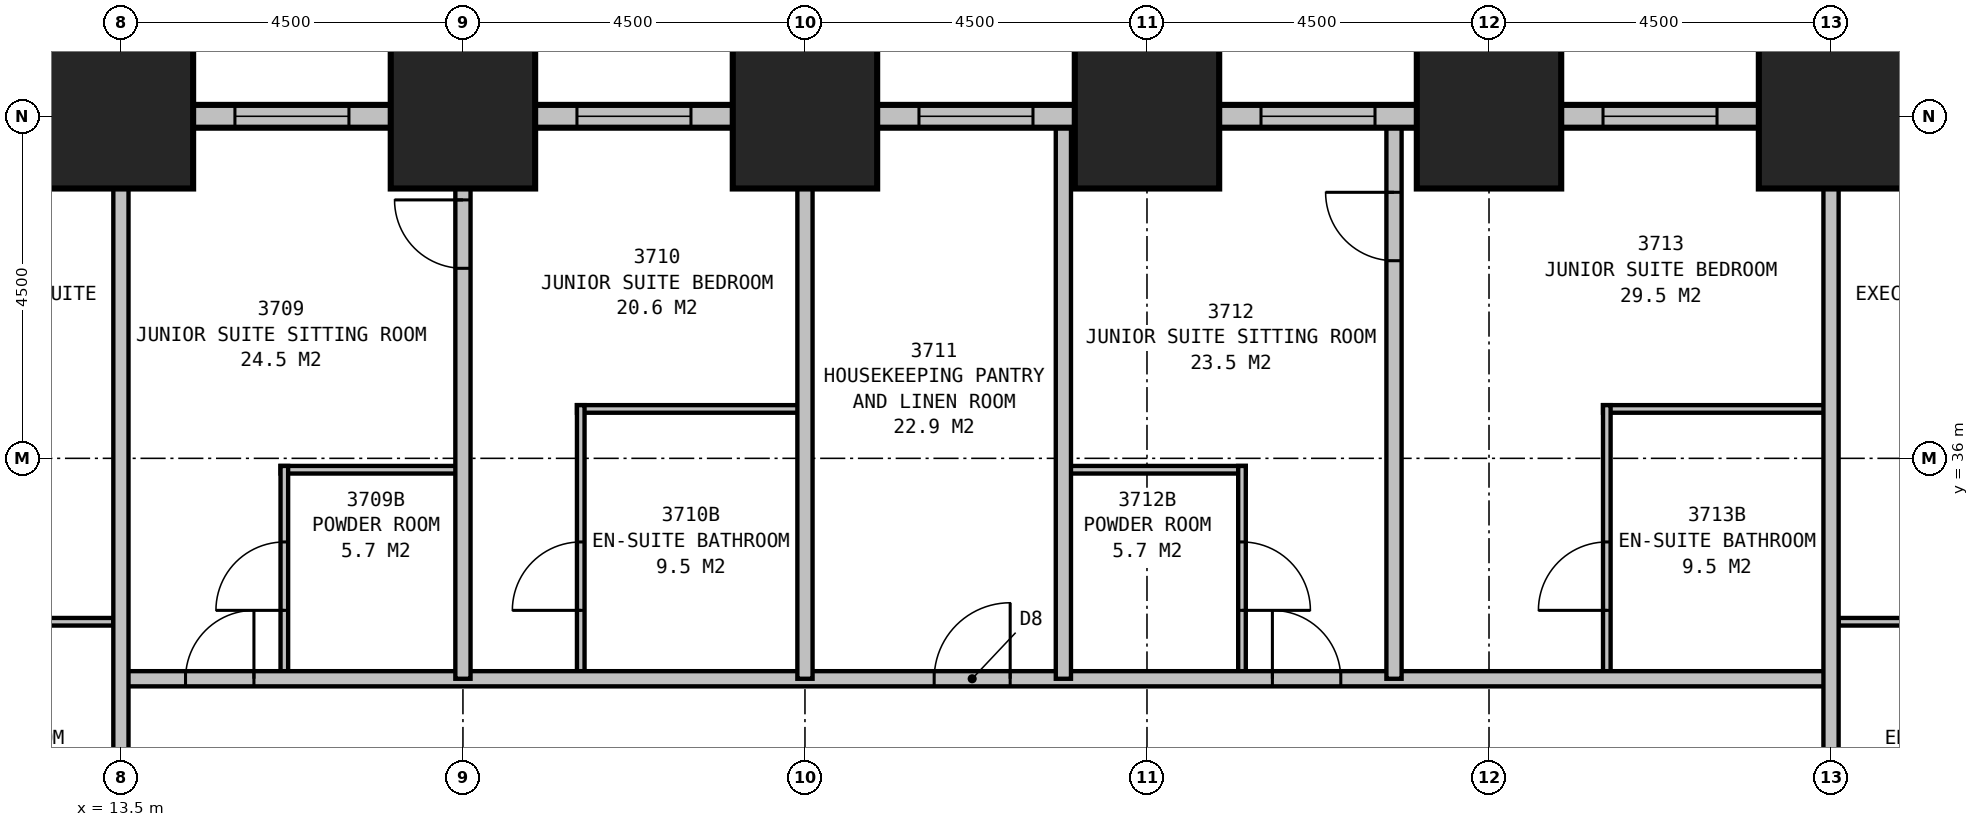
"""IFC4 building model, lengths in metres.
Left out: names, types, materials, properties, quantities, classifications, styles, units other than length and angle.
Written with IfcOpenShell. Run it as: python <this file> out.ifc"""

import sys

from ifc_helpers import new_model, si_unit, direction, frame, frame_2d, origin, origin_2d, place, context, subcontext, project, spatial, rectangle, extrude, element, fill, save


model = new_model("IFC4")
c1 = context("Model", 3, precision=1e-05, world=origin(), true_north=direction((0.0, 1.0)))
c2 = subcontext(c1, "Body", "Model", "MODEL_VIEW")
j1 = project(units=[si_unit("LENGTHUNIT", "METRE"), si_unit("PLANEANGLEUNIT", "RADIAN")], contexts=[c1])
p1 = place(None, origin())
s1 = spatial("IfcSite", under=j1, at=p1, CompositionType="ELEMENT")
p2 = place(p1, origin())
s2 = spatial("IfcBuilding", under=s1, at=p2, CompositionType="ELEMENT")
p3 = place(p2, frame((0.0, 0.0, 142.4)))
s3 = spatial("IfcBuildingStorey", under=s2, at=p3, CompositionType="ELEMENT", Elevation=142.4)
for number, where, z_axis, x_axis in (
    (1, (36.0, 40.5, 0.0), (0.0, 0.0, 1.0), (1.0, 0.0, 0.0)),
    (2, (31.5, 40.5, 0.0), (0.0, 0.0, 1.0), (1.0, 0.0, 0.0)),
    (3, (27.0, 40.5, 0.0), (0.0, 0.0, 1.0), (1.0, 0.0, 0.0)),
    (4, (22.5, 40.5, 0.0), (0.0, 0.0, 1.0), (1.0, 0.0, 0.0)),
    (5, (18.0, 40.5, 0.0), (0.0, 0.0, 1.0), (1.0, 0.0, 0.0)),
    (6, (13.5, 40.5, 0.0), (0.0, 0.0, 1.0), (1.0, 0.0, 0.0)),
):
    element("IfcColumn", number, at=place(p3, frame(where, z_axis=z_axis, x_axis=x_axis)), inside=s3, PredefinedType="COLUMN", context=c2, shape_type="SweptSolid", body=[
        extrude(rectangle(XDim=1.9, YDim=1.9, at=origin_2d()), origin(), (0.0, 0.0, 1.0), 3.5),
    ])
p4 = place(p3, frame((40.65, 40.5, 0.0), z_axis=(0.0, 0.0, 1.0), x_axis=(-1.0, 0.0, 0.0)))
e7 = element("IfcWall", 7, at=p4, inside=s3, PredefinedType="STANDARD", context=c2, shape_type="SweptSolid", body=[
    extrude(rectangle(XDim=31.8, YDim=0.3, at=frame_2d((15.9, 0.0))), origin(), (0.0, 0.0, 1.0), 2.1),
])
p5 = place(p4, frame((1.65, 0.0, 0.5)))
e8 = element("IfcOpeningElement", 8, at=p5, cuts=e7, PredefinedType="OPENING", context=c2, shape_type="SweptSolid", body=[
    extrude(rectangle(XDim=1.5, YDim=1.4, at=frame_2d((0.75, 0.7))), frame((0.0, 0.16, 0.0), z_axis=(0.0, -1.0, 0.0), x_axis=(1.0, 0.0, 0.0)), (0.0, 0.0, 1.0), 0.32),
])
p6 = place(p4, frame((6.15, 0.0, 0.5)))
e9 = element("IfcOpeningElement", 9, at=p6, cuts=e7, PredefinedType="OPENING", context=c2, shape_type="SweptSolid", body=[
    extrude(rectangle(XDim=1.5, YDim=1.4, at=frame_2d((0.75, 0.7))), frame((0.0, 0.16, 0.0), z_axis=(0.0, -1.0, 0.0), x_axis=(1.0, 0.0, 0.0)), (0.0, 0.0, 1.0), 0.32),
])
p7 = place(p4, frame((10.65, 0.0, 0.5)))
e10 = element("IfcOpeningElement", 10, at=p7, cuts=e7, PredefinedType="OPENING", context=c2, shape_type="SweptSolid", body=[
    extrude(rectangle(XDim=1.5, YDim=1.4, at=frame_2d((0.75, 0.7))), frame((0.0, 0.16, 0.0), z_axis=(0.0, -1.0, 0.0), x_axis=(1.0, 0.0, 0.0)), (0.0, 0.0, 1.0), 0.32),
])
p8 = place(p4, frame((15.15, 0.0, 0.5)))
e11 = element("IfcOpeningElement", 11, at=p8, cuts=e7, PredefinedType="OPENING", context=c2, shape_type="SweptSolid", body=[
    extrude(rectangle(XDim=1.5, YDim=1.4, at=frame_2d((0.75, 0.7))), frame((0.0, 0.16, 0.0), z_axis=(0.0, -1.0, 0.0), x_axis=(1.0, 0.0, 0.0)), (0.0, 0.0, 1.0), 0.32),
])
p9 = place(p4, frame((19.65, 0.0, 0.5)))
e12 = element("IfcOpeningElement", 12, at=p9, cuts=e7, PredefinedType="OPENING", context=c2, shape_type="SweptSolid", body=[
    extrude(rectangle(XDim=1.5, YDim=1.4, at=frame_2d((0.75, 0.7))), frame((0.0, 0.16, 0.0), z_axis=(0.0, -1.0, 0.0), x_axis=(1.0, 0.0, 0.0)), (0.0, 0.0, 1.0), 0.32),
])
p10 = place(p4, frame((24.15, 0.0, 0.5)))
e13 = element("IfcOpeningElement", 13, at=p10, cuts=e7, PredefinedType="OPENING", context=c2, shape_type="SweptSolid", body=[
    extrude(rectangle(XDim=1.5, YDim=1.4, at=frame_2d((0.75, 0.7))), frame((0.0, 0.16, 0.0), z_axis=(0.0, -1.0, 0.0), x_axis=(1.0, 0.0, 0.0)), (0.0, 0.0, 1.0), 0.32),
])
p11 = place(p4, frame((28.65, 0.0, 0.5)))
e14 = element("IfcOpeningElement", 14, at=p11, cuts=e7, PredefinedType="OPENING", context=c2, shape_type="SweptSolid", body=[
    extrude(rectangle(XDim=1.5, YDim=1.4, at=frame_2d((0.75, 0.7))), frame((0.0, 0.16, 0.0), z_axis=(0.0, -1.0, 0.0), x_axis=(1.0, 0.0, 0.0)), (0.0, 0.0, 1.0), 0.32),
])
p12 = place(p3, frame((13.5, 33.1, 0.0), z_axis=(0.0, 0.0, 1.0), x_axis=(1.0, 0.0, 0.0)))
e15 = element("IfcWall", 15, at=p12, inside=s3, PredefinedType="PARTITIONING", context=c2, shape_type="SweptSolid", body=[
    extrude(rectangle(XDim=22.5, YDim=0.2, at=frame_2d((11.25, 0.0))), origin(), (0.0, 0.0, 1.0), 3.25),
])
p13 = place(p12, frame((0.85, 0.0, 0.0)))
e16 = element("IfcOpeningElement", 16, at=p13, cuts=e15, PredefinedType="OPENING", context=c2, shape_type="SweptSolid", body=[
    extrude(rectangle(XDim=0.9, YDim=2.1, at=frame_2d((0.45, 1.05))), frame((0.0, 0.11, 0.0), z_axis=(0.0, -1.0, 0.0), x_axis=(1.0, 0.0, 0.0)), (0.0, 0.0, 1.0), 0.22),
])
p14 = place(p12, frame((10.7, 0.0, 0.0)))
e17 = element("IfcOpeningElement", 17, at=p14, cuts=e15, PredefinedType="OPENING", context=c2, shape_type="SweptSolid", body=[
    extrude(rectangle(XDim=1.0, YDim=2.1, at=frame_2d((0.5, 1.05))), frame((0.0, 0.11, 0.0), z_axis=(0.0, -1.0, 0.0), x_axis=(1.0, 0.0, 0.0)), (0.0, 0.0, 1.0), 0.22),
])
p15 = place(p12, frame((15.15, 0.0, 0.0)))
e18 = element("IfcOpeningElement", 18, at=p15, cuts=e15, PredefinedType="OPENING", context=c2, shape_type="SweptSolid", body=[
    extrude(rectangle(XDim=0.9, YDim=2.1, at=frame_2d((0.45, 1.05))), frame((0.0, 0.11, 0.0), z_axis=(0.0, -1.0, 0.0), x_axis=(1.0, 0.0, 0.0)), (0.0, 0.0, 1.0), 0.22),
])
p16 = place(p3, frame((18.0, 33.1, 0.0), z_axis=(0.0, 0.0, 1.0), x_axis=(0.0, 1.0, 0.0)))
e19 = element("IfcWall", 19, at=p16, inside=s3, PredefinedType="PARTITIONING", context=c2, shape_type="SweptSolid", body=[
    extrude(rectangle(XDim=7.4, YDim=0.2, at=frame_2d((3.7, 0.0))), origin(), (0.0, 0.0, 1.0), 2.2),
])
p17 = place(p16, frame((5.4, 0.0, 0.0)))
e20 = element("IfcOpeningElement", 20, at=p17, cuts=e19, PredefinedType="OPENING", context=c2, shape_type="SweptSolid", body=[
    extrude(rectangle(XDim=0.9, YDim=2.1, at=frame_2d((0.45, 1.05))), frame((0.0, 0.11, 0.0), z_axis=(0.0, -1.0, 0.0), x_axis=(1.0, 0.0, 0.0)), (0.0, 0.0, 1.0), 0.22),
])
p18 = place(p3, frame((22.5, 33.1, 0.0), z_axis=(0.0, 0.0, 1.0), x_axis=(0.0, 1.0, 0.0)))
e21 = element("IfcWall", 21, at=p18, inside=s3, PredefinedType="PARTITIONING", context=c2, shape_type="SweptSolid", body=[
    extrude(rectangle(XDim=7.4, YDim=0.2, at=frame_2d((3.7, 0.0))), origin(), (0.0, 0.0, 1.0), 2.2),
])
p19 = place(p3, frame((25.9, 33.1, 0.0), z_axis=(0.0, 0.0, 1.0), x_axis=(0.0, 1.0, 0.0)))
e22 = element("IfcWall", 22, at=p19, inside=s3, PredefinedType="PARTITIONING", context=c2, shape_type="SweptSolid", body=[
    extrude(rectangle(XDim=7.4, YDim=0.2, at=frame_2d((3.7, 0.0))), origin(), (0.0, 0.0, 1.0), 3.25),
])
p20 = place(p3, frame((30.25, 33.1, 0.0), z_axis=(0.0, 0.0, 1.0), x_axis=(0.0, 1.0, 0.0)))
e23 = element("IfcWall", 23, at=p20, inside=s3, PredefinedType="PARTITIONING", context=c2, shape_type="SweptSolid", body=[
    extrude(rectangle(XDim=7.4, YDim=0.2, at=frame_2d((3.7, 0.0))), origin(), (0.0, 0.0, 1.0), 3.25),
])
p21 = place(p20, frame((5.5, 0.0, 0.0)))
e24 = element("IfcOpeningElement", 24, at=p21, cuts=e23, PredefinedType="OPENING", context=c2, shape_type="SweptSolid", body=[
    extrude(rectangle(XDim=0.9, YDim=2.1, at=frame_2d((0.45, 1.05))), frame((0.0, 0.11, 0.0), z_axis=(0.0, -1.0, 0.0), x_axis=(1.0, 0.0, 0.0)), (0.0, 0.0, 1.0), 0.22),
])
p22 = place(p3, frame((15.6, 35.85, 0.0), z_axis=(0.0, 0.0, 1.0), x_axis=(1.0, 0.0, 0.0)))
e25 = element("IfcWall", 25, at=p22, inside=s3, PredefinedType="PLUMBINGWALL", context=c2, shape_type="SweptSolid", body=[
    extrude(rectangle(XDim=2.4, YDim=0.1, at=frame_2d((1.2, 0.0))), origin(), (0.0, 0.0, 1.0), 3.25),
])
p23 = place(p3, frame((15.65, 33.1, 0.0), z_axis=(0.0, 0.0, 1.0), x_axis=(0.0, 1.0, 0.0)))
e26 = element("IfcWall", 26, at=p23, inside=s3, PredefinedType="PLUMBINGWALL", context=c2, shape_type="SweptSolid", body=[
    extrude(rectangle(XDim=2.8, YDim=0.1, at=frame_2d((1.4, 0.0))), origin(), (0.0, 0.0, 1.0), 3.25),
])
p24 = place(p23, frame((0.9, 0.0, 0.0)))
e27 = element("IfcOpeningElement", 27, at=p24, cuts=e26, PredefinedType="OPENING", context=c2, shape_type="SweptSolid", body=[
    extrude(rectangle(XDim=0.9, YDim=2.1, at=frame_2d((0.45, 1.05))), frame((0.0, 0.06, 0.0), z_axis=(0.0, -1.0, 0.0), x_axis=(1.0, 0.0, 0.0)), (0.0, 0.0, 1.0), 0.12),
])
p25 = place(p3, frame((19.5, 36.65, 0.0), z_axis=(0.0, 0.0, 1.0), x_axis=(1.0, 0.0, 0.0)))
e28 = element("IfcWall", 28, at=p25, inside=s3, PredefinedType="PLUMBINGWALL", context=c2, shape_type="SweptSolid", body=[
    extrude(rectangle(XDim=3.0, YDim=0.1, at=frame_2d((1.5, 0.0))), origin(), (0.0, 0.0, 1.0), 3.25),
])
p26 = place(p3, frame((19.55, 33.1, 0.0), z_axis=(0.0, 0.0, 1.0), x_axis=(0.0, 1.0, 0.0)))
e29 = element("IfcWall", 29, at=p26, inside=s3, PredefinedType="PLUMBINGWALL", context=c2, shape_type="SweptSolid", body=[
    extrude(rectangle(XDim=3.6, YDim=0.1, at=frame_2d((1.8, 0.0))), origin(), (0.0, 0.0, 1.0), 3.25),
])
p27 = place(p26, frame((0.9, 0.0, 0.0)))
e30 = element("IfcOpeningElement", 30, at=p27, cuts=e29, PredefinedType="OPENING", context=c2, shape_type="SweptSolid", body=[
    extrude(rectangle(XDim=0.9, YDim=2.1, at=frame_2d((0.45, 1.05))), frame((0.0, 0.06, 0.0), z_axis=(0.0, -1.0, 0.0), x_axis=(1.0, 0.0, 0.0)), (0.0, 0.0, 1.0), 0.12),
])
p28 = place(p3, frame((25.9, 35.85, 0.0), z_axis=(0.0, 0.0, 1.0), x_axis=(1.0, 0.0, 0.0)))
e31 = element("IfcWall", 31, at=p28, inside=s3, PredefinedType="PLUMBINGWALL", context=c2, shape_type="SweptSolid", body=[
    extrude(rectangle(XDim=2.4, YDim=0.1, at=frame_2d((1.2, 0.0))), origin(), (0.0, 0.0, 1.0), 3.25),
])
p29 = place(p3, frame((28.25, 33.1, 0.0), z_axis=(0.0, 0.0, 1.0), x_axis=(0.0, 1.0, 0.0)))
e32 = element("IfcWall", 32, at=p29, inside=s3, PredefinedType="PLUMBINGWALL", context=c2, shape_type="SweptSolid", body=[
    extrude(rectangle(XDim=2.8, YDim=0.1, at=frame_2d((1.4, 0.0))), origin(), (0.0, 0.0, 1.0), 3.25),
])
p30 = place(p29, frame((1.8, 0.0, 0.0), z_axis=(0.0, 0.0, 1.0), x_axis=(-1.0, 0.0, 0.0)))
e33 = element("IfcOpeningElement", 33, at=p30, cuts=e32, PredefinedType="OPENING", context=c2, shape_type="SweptSolid", body=[
    extrude(rectangle(XDim=0.9, YDim=2.1, at=frame_2d((0.45, 1.05))), frame((0.0, 0.06, 0.0), z_axis=(0.0, -1.0, 0.0), x_axis=(1.0, 0.0, 0.0)), (0.0, 0.0, 1.0), 0.12),
])
p31 = place(p3, frame((33.0, 36.65, 0.0), z_axis=(0.0, 0.0, 1.0), x_axis=(1.0, 0.0, 0.0)))
e34 = element("IfcWall", 34, at=p31, inside=s3, PredefinedType="PLUMBINGWALL", context=c2, shape_type="SweptSolid", body=[
    extrude(rectangle(XDim=3.0, YDim=0.1, at=frame_2d((1.5, 0.0))), origin(), (0.0, 0.0, 1.0), 3.25),
])
p32 = place(p3, frame((33.05, 33.1, 0.0), z_axis=(0.0, 0.0, 1.0), x_axis=(0.0, 1.0, 0.0)))
e35 = element("IfcWall", 35, at=p32, inside=s3, PredefinedType="PLUMBINGWALL", context=c2, shape_type="SweptSolid", body=[
    extrude(rectangle(XDim=3.6, YDim=0.1, at=frame_2d((1.8, 0.0))), origin(), (0.0, 0.0, 1.0), 3.25),
])
p33 = place(p32, frame((0.9, 0.0, 0.0)))
e36 = element("IfcOpeningElement", 36, at=p33, cuts=e35, PredefinedType="OPENING", context=c2, shape_type="SweptSolid", body=[
    extrude(rectangle(XDim=0.9, YDim=2.1, at=frame_2d((0.45, 1.05))), frame((0.0, 0.06, 0.0), z_axis=(0.0, -1.0, 0.0), x_axis=(1.0, 0.0, 0.0)), (0.0, 0.0, 1.0), 0.12),
])
p34 = place(p3, frame((36.0, 29.3, 0.0), z_axis=(0.0, 0.0, 1.0), x_axis=(0.0, 1.0, 0.0)))
e37 = element("IfcWall", 37, at=p34, inside=s3, PredefinedType="PARTITIONING", context=c2, shape_type="SweptSolid", body=[
    extrude(rectangle(XDim=11.2, YDim=0.2, at=frame_2d((5.6, 0.0))), origin(), (0.0, 0.0, 1.0), 2.2),
])
p35 = place(p3, frame((36.1, 33.85, 0.0), z_axis=(0.0, 0.0, 1.0), x_axis=(1.0, 0.0, 0.0)))
e38 = element("IfcWall", 38, at=p35, inside=s3, PredefinedType="PLUMBINGWALL", context=c2, shape_type="SweptSolid", body=[
    extrude(rectangle(XDim=3.5, YDim=0.1, at=frame_2d((1.75, 0.0))), origin(), (0.0, 0.0, 1.0), 3.25),
])
p36 = place(p35, frame((0.9, 0.0, 0.0)))
e39 = element("IfcOpeningElement", 39, at=p36, cuts=e38, PredefinedType="OPENING", context=c2, shape_type="SweptSolid", body=[
    extrude(rectangle(XDim=0.9, YDim=2.1, at=frame_2d((0.45, 1.05))), frame((0.0, 0.06, 0.0), z_axis=(0.0, -1.0, 0.0), x_axis=(1.0, 0.0, 0.0)), (0.0, 0.0, 1.0), 0.12),
])
p37 = place(p3, frame((13.5, 29.3, 0.0), z_axis=(0.0, 0.0, 1.0), x_axis=(0.0, 1.0, 0.0)))
e40 = element("IfcWall", 40, at=p37, inside=s3, PredefinedType="PARTITIONING", context=c2, shape_type="SweptSolid", body=[
    extrude(rectangle(XDim=11.2, YDim=0.2, at=frame_2d((5.6, 0.0))), origin(), (0.0, 0.0, 1.0), 2.2),
])
p38 = place(p3, frame((13.4, 33.85, 0.0), z_axis=(0.0, 0.0, 1.0), x_axis=(-1.0, 0.0, 0.0)))
e41 = element("IfcWall", 41, at=p38, inside=s3, PredefinedType="PLUMBINGWALL", context=c2, shape_type="SweptSolid", body=[
    extrude(rectangle(XDim=3.5, YDim=0.1, at=frame_2d((1.75, 0.0))), origin(), (0.0, 0.0, 1.0), 3.25),
])
p39 = place(p38, frame((1.8, 0.0, 0.0), z_axis=(0.0, 0.0, 1.0), x_axis=(-1.0, 0.0, 0.0)))
e42 = element("IfcOpeningElement", 42, at=p39, cuts=e41, PredefinedType="OPENING", context=c2, shape_type="SweptSolid", body=[
    extrude(rectangle(XDim=0.9, YDim=2.1, at=frame_2d((0.45, 1.05))), frame((0.0, 0.06, 0.0), z_axis=(0.0, -1.0, 0.0), x_axis=(1.0, 0.0, 0.0)), (0.0, 0.0, 1.0), 0.12),
])
p40 = place(p6, origin())
e43 = element("IfcWindow", 43, at=p40, inside=s3, PartitioningType="SINGLE_PANEL", PredefinedType="WINDOW", context=c2, shape_type="SweptSolid", body=[
    extrude(rectangle(XDim=1.5, YDim=1.4, at=frame_2d((0.75, 0.7))), frame((0.0, 0.03, 0.0), z_axis=(0.0, -1.0, 0.0), x_axis=(1.0, 0.0, 0.0)), (0.0, 0.0, 1.0), 0.06),
])
fill(e9, e43)
p41 = place(p7, origin())
e44 = element("IfcWindow", 44, at=p41, inside=s3, PartitioningType="SINGLE_PANEL", PredefinedType="WINDOW", context=c2, shape_type="SweptSolid", body=[
    extrude(rectangle(XDim=1.5, YDim=1.4, at=frame_2d((0.75, 0.7))), frame((0.0, 0.03, 0.0), z_axis=(0.0, -1.0, 0.0), x_axis=(1.0, 0.0, 0.0)), (0.0, 0.0, 1.0), 0.06),
])
fill(e10, e44)
p42 = place(p8, origin())
e45 = element("IfcWindow", 45, at=p42, inside=s3, PartitioningType="SINGLE_PANEL", PredefinedType="WINDOW", context=c2, shape_type="SweptSolid", body=[
    extrude(rectangle(XDim=1.5, YDim=1.4, at=frame_2d((0.75, 0.7))), frame((0.0, 0.03, 0.0), z_axis=(0.0, -1.0, 0.0), x_axis=(1.0, 0.0, 0.0)), (0.0, 0.0, 1.0), 0.06),
])
fill(e11, e45)
p43 = place(p9, origin())
e46 = element("IfcWindow", 46, at=p43, inside=s3, PartitioningType="SINGLE_PANEL", PredefinedType="WINDOW", context=c2, shape_type="SweptSolid", body=[
    extrude(rectangle(XDim=1.5, YDim=1.4, at=frame_2d((0.75, 0.7))), frame((0.0, 0.03, 0.0), z_axis=(0.0, -1.0, 0.0), x_axis=(1.0, 0.0, 0.0)), (0.0, 0.0, 1.0), 0.06),
])
fill(e12, e46)
p44 = place(p10, origin())
e47 = element("IfcWindow", 47, at=p44, inside=s3, PartitioningType="SINGLE_PANEL", PredefinedType="WINDOW", context=c2, shape_type="SweptSolid", body=[
    extrude(rectangle(XDim=1.5, YDim=1.4, at=frame_2d((0.75, 0.7))), frame((0.0, 0.03, 0.0), z_axis=(0.0, -1.0, 0.0), x_axis=(1.0, 0.0, 0.0)), (0.0, 0.0, 1.0), 0.06),
])
fill(e13, e47)
p45 = place(p13, origin())
e48 = element("IfcDoor", 48, at=p45, inside=s3, OperationType="SINGLE_SWING_RIGHT", PredefinedType="DOOR", context=c2, shape_type="SweptSolid", body=[
    extrude(rectangle(XDim=0.9, YDim=2.1, at=frame_2d((0.45, 1.05))), frame((0.0, 0.025, 0.0), z_axis=(0.0, -1.0, 0.0), x_axis=(1.0, 0.0, 0.0)), (0.0, 0.0, 1.0), 0.05),
])
fill(e16, e48)
p46 = place(p14, origin())
e49 = element("IfcDoor", 49, at=p46, inside=s3, OperationType="SINGLE_SWING_RIGHT", PredefinedType="DOOR", context=c2, shape_type="SweptSolid", body=[
    extrude(rectangle(XDim=1.0, YDim=2.1, at=frame_2d((0.5, 1.05))), frame((0.0, 0.025, 0.0), z_axis=(0.0, -1.0, 0.0), x_axis=(1.0, 0.0, 0.0)), (0.0, 0.0, 1.0), 0.05),
])
fill(e17, e49)
p47 = place(p15, origin())
e50 = element("IfcDoor", 50, at=p47, inside=s3, OperationType="SINGLE_SWING_LEFT", PredefinedType="DOOR", context=c2, shape_type="SweptSolid", body=[
    extrude(rectangle(XDim=0.9, YDim=2.1, at=frame_2d((0.45, 1.05))), frame((0.0, 0.025, 0.0), z_axis=(0.0, -1.0, 0.0), x_axis=(1.0, 0.0, 0.0)), (0.0, 0.0, 1.0), 0.05),
])
fill(e18, e50)
p48 = place(p17, origin())
e51 = element("IfcDoor", 51, at=p48, inside=s3, OperationType="SINGLE_SWING_RIGHT", PredefinedType="DOOR", context=c2, shape_type="SweptSolid", body=[
    extrude(rectangle(XDim=0.9, YDim=2.1, at=frame_2d((0.45, 1.05))), frame((0.0, 0.025, 0.0), z_axis=(0.0, -1.0, 0.0), x_axis=(1.0, 0.0, 0.0)), (0.0, 0.0, 1.0), 0.05),
])
fill(e20, e51)
p49 = place(p21, origin())
e52 = element("IfcDoor", 52, at=p49, inside=s3, OperationType="SINGLE_SWING_RIGHT", PredefinedType="DOOR", context=c2, shape_type="SweptSolid", body=[
    extrude(rectangle(XDim=0.9, YDim=2.1, at=frame_2d((0.45, 1.05))), frame((0.0, 0.025, 0.0), z_axis=(0.0, -1.0, 0.0), x_axis=(1.0, 0.0, 0.0)), (0.0, 0.0, 1.0), 0.05),
])
fill(e24, e52)
p50 = place(p24, origin())
e53 = element("IfcDoor", 53, at=p50, inside=s3, OperationType="SINGLE_SWING_LEFT", PredefinedType="DOOR", context=c2, shape_type="SweptSolid", body=[
    extrude(rectangle(XDim=0.9, YDim=2.1, at=frame_2d((0.45, 1.05))), frame((0.0, 0.025, 0.0), z_axis=(0.0, -1.0, 0.0), x_axis=(1.0, 0.0, 0.0)), (0.0, 0.0, 1.0), 0.05),
])
fill(e27, e53)
p51 = place(p27, origin())
e54 = element("IfcDoor", 54, at=p51, inside=s3, OperationType="SINGLE_SWING_LEFT", PredefinedType="DOOR", context=c2, shape_type="SweptSolid", body=[
    extrude(rectangle(XDim=0.9, YDim=2.1, at=frame_2d((0.45, 1.05))), frame((0.0, 0.025, 0.0), z_axis=(0.0, -1.0, 0.0), x_axis=(1.0, 0.0, 0.0)), (0.0, 0.0, 1.0), 0.05),
])
fill(e30, e54)
p52 = place(p30, origin())
e55 = element("IfcDoor", 55, at=p52, inside=s3, OperationType="SINGLE_SWING_RIGHT", PredefinedType="DOOR", context=c2, shape_type="SweptSolid", body=[
    extrude(rectangle(XDim=0.9, YDim=2.1, at=frame_2d((0.45, 1.05))), frame((0.0, 0.025, 0.0), z_axis=(0.0, -1.0, 0.0), x_axis=(1.0, 0.0, 0.0)), (0.0, 0.0, 1.0), 0.05),
])
fill(e33, e55)
p53 = place(p33, origin())
e56 = element("IfcDoor", 56, at=p53, inside=s3, OperationType="SINGLE_SWING_LEFT", PredefinedType="DOOR", context=c2, shape_type="SweptSolid", body=[
    extrude(rectangle(XDim=0.9, YDim=2.1, at=frame_2d((0.45, 1.05))), frame((0.0, 0.025, 0.0), z_axis=(0.0, -1.0, 0.0), x_axis=(1.0, 0.0, 0.0)), (0.0, 0.0, 1.0), 0.05),
])
fill(e36, e56)
save(model, sys.argv[1])
